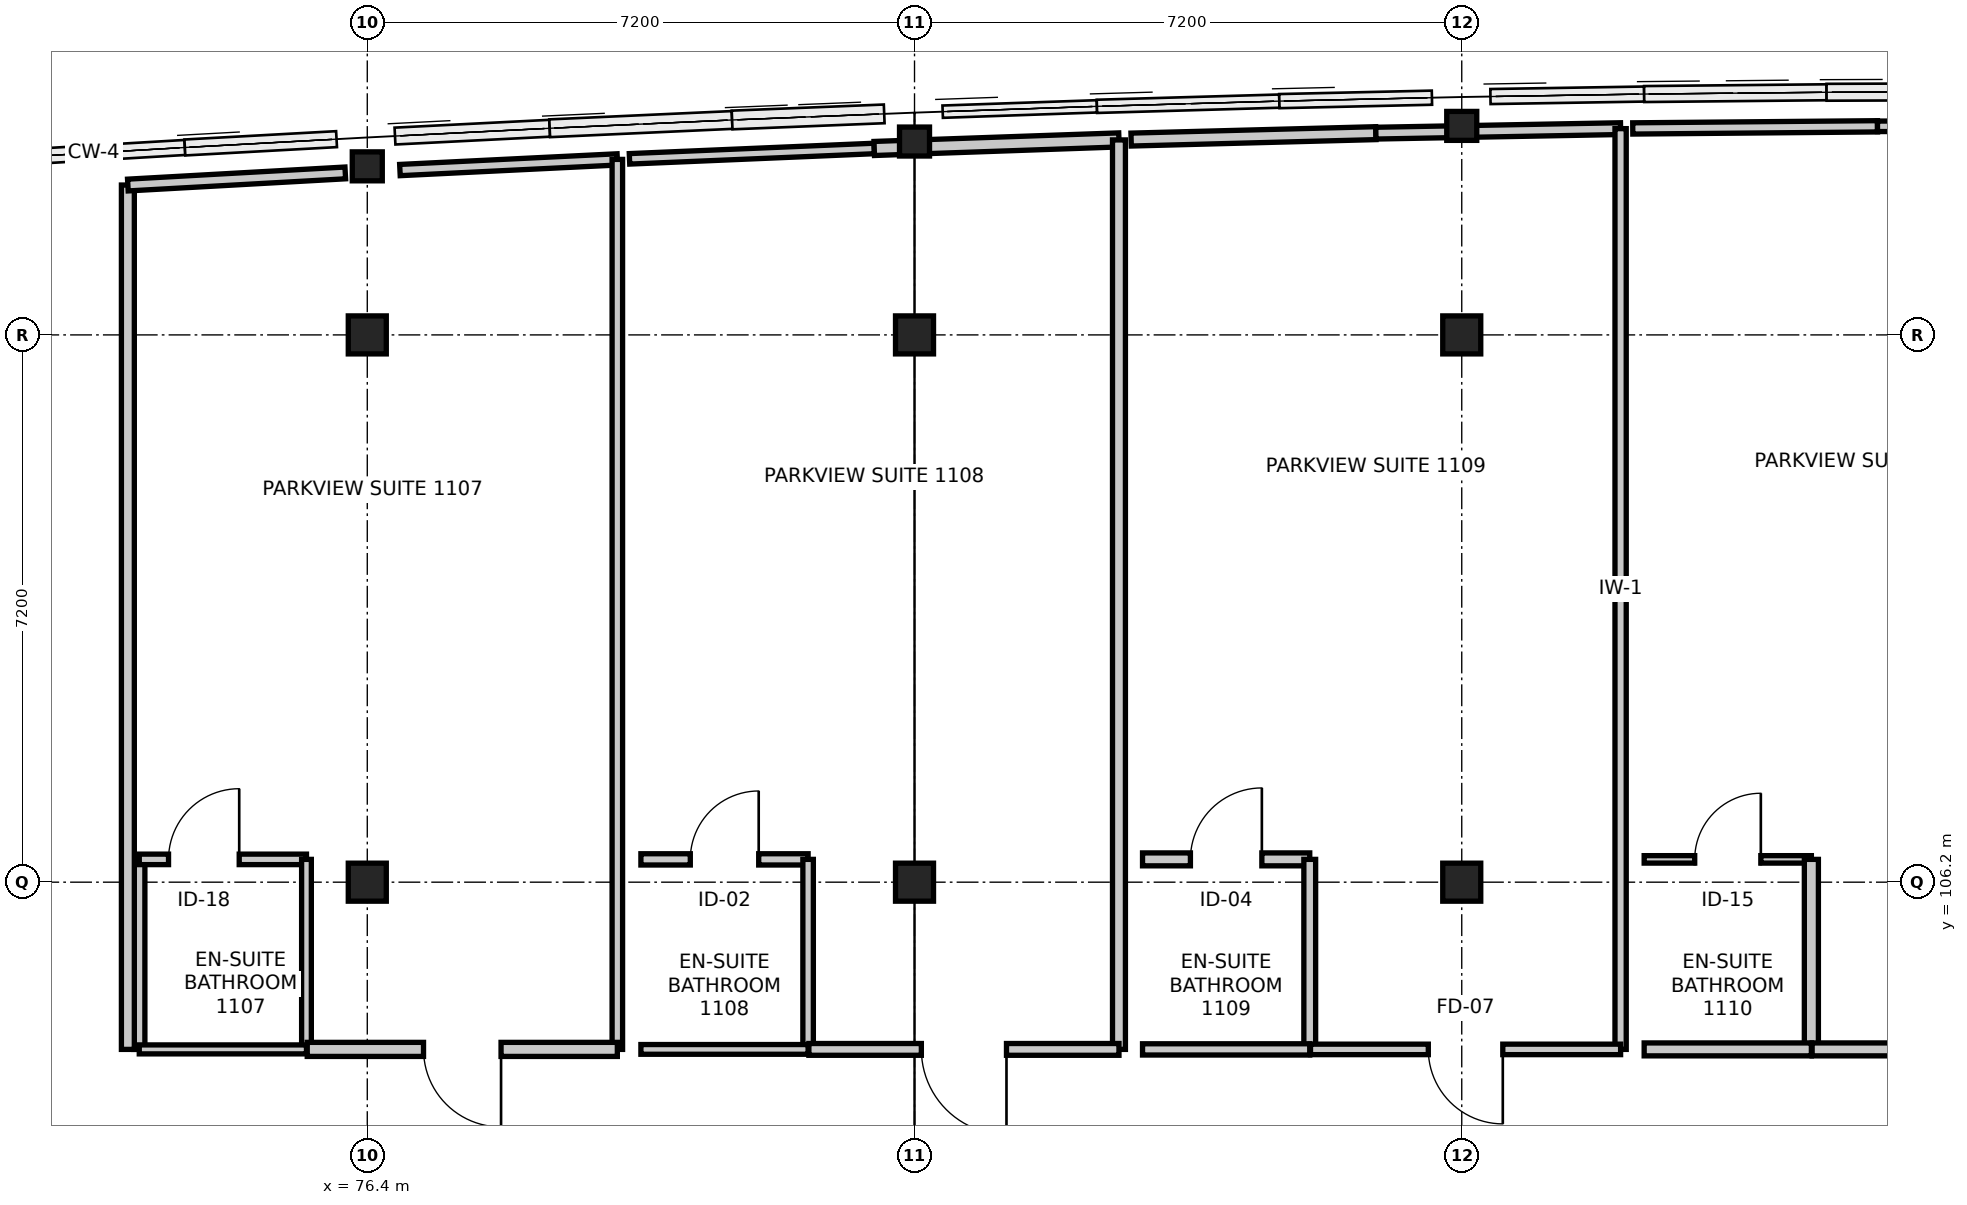
"""IFC4 building model, lengths in metres.
Left out: names, types, materials, properties, quantities, classifications, styles, units other than length and angle.
Written with IfcOpenShell. Run it as: python <this file> out.ifc"""

import sys

from ifc_helpers import new_model, si_unit, direction, frame, frame_2d, origin, origin_2d, place, context, subcontext, project, spatial, rectangle, i_section, extrude, element, fill, save


model = new_model("IFC4")
c1 = context("Model", 3, precision=1e-05, world=origin(), true_north=direction((0.0, 1.0)))
c2 = subcontext(c1, "Body", "Model", "MODEL_VIEW")
j1 = project(units=[si_unit("LENGTHUNIT", "METRE"), si_unit("PLANEANGLEUNIT", "RADIAN")], contexts=[c1])
p1 = place(None, origin())
s1 = spatial("IfcSite", under=j1, at=p1, CompositionType="ELEMENT")
p2 = place(p1, origin())
s2 = spatial("IfcBuilding", under=s1, at=p2, CompositionType="ELEMENT")
p3 = place(p2, frame((0.0, 0.0, 44.4)))
s3 = spatial("IfcBuildingStorey", under=s2, at=p3, CompositionType="ELEMENT", Elevation=44.4)
for number, where, z_axis, x_axis in (
    (1, (76.4, 106.2, 0.0), (0.0, 0.0, 1.0), (1.0, 0.0, 0.0)),
    (2, (76.4, 113.4, 0.0), (0.0, 0.0, 1.0), (1.0, 0.0, 0.0)),
):
    element("IfcColumn", number, at=place(p3, frame(where, z_axis=z_axis, x_axis=x_axis)), inside=s3, PredefinedType="COLUMN", context=c2, shape_type="SweptSolid", body=[
        extrude(rectangle(XDim=0.5, YDim=0.5, at=origin_2d()), origin(), (0.0, 0.0, 1.0), 4.2),
    ])
p4 = place(p3, frame((76.4, 115.618, 0.0), z_axis=(0.0, 0.0, 1.0), x_axis=(1.0, 0.0, 0.0)))
e3 = element("IfcColumn", 3, at=p4, inside=s3, PredefinedType="COLUMN", context=c2, shape_type="SweptSolid", body=[
    extrude(i_section(OverallWidth=0.395, OverallDepth=0.381, WebThickness=0.018, FlangeThickness=0.03, FilletRadius=0.015, at=origin_2d()), origin(), (0.0, 0.0, 1.0), 4.2),
])
for number, where, z_axis, x_axis in (
    (4, (83.6, 106.2, 0.0), (0.0, 0.0, 1.0), (1.0, 0.0, 0.0)),
    (5, (83.6, 113.4, 0.0), (0.0, 0.0, 1.0), (1.0, 0.0, 0.0)),
):
    element("IfcColumn", number, at=place(p3, frame(where, z_axis=z_axis, x_axis=x_axis)), inside=s3, PredefinedType="COLUMN", context=c2, shape_type="SweptSolid", body=[
        extrude(rectangle(XDim=0.5, YDim=0.5, at=origin_2d()), origin(), (0.0, 0.0, 1.0), 4.2),
    ])
p5 = place(p3, frame((83.6, 115.944, 0.0), z_axis=(0.0, 0.0, 1.0), x_axis=(1.0, 0.0, 0.0)))
e6 = element("IfcColumn", 6, at=p5, inside=s3, PredefinedType="COLUMN", context=c2, shape_type="SweptSolid", body=[
    extrude(i_section(OverallWidth=0.395, OverallDepth=0.381, WebThickness=0.018, FlangeThickness=0.03, FilletRadius=0.015, at=origin_2d()), origin(), (0.0, 0.0, 1.0), 4.2),
])
for number, where, z_axis, x_axis in (
    (7, (90.8, 106.2, 0.0), (0.0, 0.0, 1.0), (1.0, 0.0, 0.0)),
    (8, (90.8, 113.4, 0.0), (0.0, 0.0, 1.0), (1.0, 0.0, 0.0)),
):
    element("IfcColumn", number, at=place(p3, frame(where, z_axis=z_axis, x_axis=x_axis)), inside=s3, PredefinedType="COLUMN", context=c2, shape_type="SweptSolid", body=[
        extrude(rectangle(XDim=0.5, YDim=0.5, at=origin_2d()), origin(), (0.0, 0.0, 1.0), 4.2),
    ])
p6 = place(p3, frame((90.8, 116.15, 0.0), z_axis=(0.0, 0.0, 1.0), x_axis=(1.0, 0.0, 0.0)))
e9 = element("IfcColumn", 9, at=p6, inside=s3, PredefinedType="COLUMN", context=c2, shape_type="SweptSolid", body=[
    extrude(i_section(OverallWidth=0.395, OverallDepth=0.381, WebThickness=0.018, FlangeThickness=0.03, FilletRadius=0.015, at=origin_2d()), origin(), (0.0, 0.0, 1.0), 4.2),
])
p7 = place(p3, frame((73.4, 104.0, 0.0), z_axis=(0.0, 0.0, 1.0), x_axis=(0.0, 1.0, 0.0)))
e10 = element("IfcWall", 10, at=p7, inside=s3, PredefinedType="PARTITIONING", context=c2, shape_type="SweptSolid", body=[
    extrude(rectangle(XDim=2.5, YDim=0.148, at=frame_2d((1.25, 0.0))), origin(), (0.0, 0.0, 1.0), 3.335),
])
p8 = place(p3, frame((73.4, 106.5, 0.0), z_axis=(0.0, 0.0, 1.0), x_axis=(1.0, 0.0, 0.0)))
e11 = element("IfcWall", 11, at=p8, inside=s3, PredefinedType="PARTITIONING", context=c2, shape_type="SweptSolid", body=[
    extrude(rectangle(XDim=2.2, YDim=0.138, at=frame_2d((1.1, 0.0))), origin(), (0.0, 0.0, 1.0), 3.95),
])
p9 = place(p8, frame((0.385, 0.0, 0.0)))
e12 = element("IfcOpeningElement", 12, at=p9, cuts=e11, PredefinedType="OPENING", context=c2, shape_type="SweptSolid", body=[
    extrude(rectangle(XDim=0.93, YDim=2.13, at=frame_2d((0.465, 1.065))), frame((0.0, 0.079, 0.0), z_axis=(0.0, -1.0, 0.0), x_axis=(1.0, 0.0, 0.0)), (0.0, 0.0, 1.0), 0.158),
])
p10 = place(p3, frame((75.6, 106.5, 0.0), z_axis=(0.0, 0.0, 1.0), x_axis=(0.0, -1.0, 0.0)))
e13 = element("IfcWall", 13, at=p10, inside=s3, PredefinedType="PARTITIONING", context=c2, shape_type="SweptSolid", body=[
    extrude(rectangle(XDim=2.5, YDim=0.128, at=frame_2d((1.25, 0.0))), origin(), (0.0, 0.0, 1.0), 3.335),
])
p11 = place(p3, frame((75.6, 104.0, 0.0), z_axis=(0.0, 0.0, 1.0), x_axis=(-1.0, 0.0, 0.0)))
e14 = element("IfcWall", 14, at=p11, inside=s3, PredefinedType="PARTITIONING", context=c2, shape_type="SweptSolid", body=[
    extrude(rectangle(XDim=2.2, YDim=0.118, at=frame_2d((1.1, 0.0))), origin(), (0.0, 0.0, 1.0), 3.95),
])
p12 = place(p3, frame((73.25, 104.0, 0.0), z_axis=(0.0, 0.0, 1.0), x_axis=(0.0, 1.0, 0.0)))
e15 = element("IfcWall", 15, at=p12, inside=s3, PredefinedType="PARTITIONING", context=c2, shape_type="SweptSolid", body=[
    extrude(rectangle(XDim=11.372, YDim=0.17, at=frame_2d((5.686, 0.0))), origin(), (0.0, 0.0, 1.0), 3.335),
])
p13 = place(p3, frame((73.25, 115.372, 0.0), z_axis=(0.0, 0.0, 1.0), x_axis=(0.998450636667, 0.05564464161, 0.0)))
e16 = element("IfcWall", 16, at=p13, inside=s3, PredefinedType="PARTITIONING", context=c2, shape_type="SweptSolid", body=[
    extrude(rectangle(XDim=2.865, YDim=0.155, at=frame_2d((1.433, 0.0))), origin(), (0.0, 0.0, 1.0), 3.526),
])
p14 = place(p3, frame((76.83, 115.569, 0.0), z_axis=(0.0, 0.0, 1.0), x_axis=(0.998802007512, 0.048934137275, 0.0)))
e17 = element("IfcWall", 17, at=p14, inside=s3, PredefinedType="PARTITIONING", context=c2, shape_type="SweptSolid", body=[
    extrude(rectangle(XDim=2.864, YDim=0.148, at=frame_2d((1.432, 0.0))), origin(), (0.0, 0.0, 1.0), 3.526),
])
p15 = place(p3, frame((79.69, 115.709, 0.0), z_axis=(0.0, 0.0, 1.0), x_axis=(0.0, -1.0, 0.0)))
e18 = element("IfcWall", 18, at=p15, inside=s3, PredefinedType="PARTITIONING", context=c2, shape_type="SweptSolid", body=[
    extrude(rectangle(XDim=11.709, YDim=0.138, at=frame_2d((5.854, 0.0))), origin(), (0.0, 0.0, 1.0), 3.335),
])
p16 = place(p3, frame((79.69, 104.0, 0.0), z_axis=(0.0, 0.0, 1.0), x_axis=(-1.0, 0.0, 0.0)))
e19 = element("IfcWall", 19, at=p16, inside=s3, PredefinedType="PARTITIONING", context=c2, shape_type="SweptSolid", body=[
    extrude(rectangle(XDim=4.08, YDim=0.185, at=frame_2d((2.04, 0.0))), origin(), (0.0, 0.0, 1.0), 3.285),
])
p17 = place(p16, frame((1.53, 0.0, 0.0)))
e20 = element("IfcOpeningElement", 20, at=p17, cuts=e19, PredefinedType="OPENING", context=c2, shape_type="SweptSolid", body=[
    extrude(rectangle(XDim=1.02, YDim=2.15, at=frame_2d((0.51, 1.075))), frame((0.0, 0.103, 0.0), z_axis=(0.0, -1.0, 0.0), x_axis=(1.0, 0.0, 0.0)), (0.0, 0.0, 1.0), 0.205),
])
p18 = place(p3, frame((80.0, 106.5, 0.0), z_axis=(0.0, 0.0, 1.0), x_axis=(1.0, 0.0, 0.0)))
e21 = element("IfcWall", 21, at=p18, inside=s3, PredefinedType="PARTITIONING", context=c2, shape_type="SweptSolid", body=[
    extrude(rectangle(XDim=2.2, YDim=0.148, at=frame_2d((1.1, 0.0))), origin(), (0.0, 0.0, 1.0), 3.95),
])
p19 = place(p18, frame((0.65, 0.0, 0.0)))
e22 = element("IfcOpeningElement", 22, at=p19, cuts=e21, PredefinedType="OPENING", context=c2, shape_type="SweptSolid", body=[
    extrude(rectangle(XDim=0.9, YDim=2.08, at=frame_2d((0.45, 1.04))), frame((0.0, 0.084, 0.0), z_axis=(0.0, -1.0, 0.0), x_axis=(1.0, 0.0, 0.0)), (0.0, 0.0, 1.0), 0.168),
])
p20 = place(p3, frame((82.2, 106.5, 0.0), z_axis=(0.0, 0.0, 1.0), x_axis=(0.0, -1.0, 0.0)))
e23 = element("IfcWall", 23, at=p20, inside=s3, PredefinedType="PARTITIONING", context=c2, shape_type="SweptSolid", body=[
    extrude(rectangle(XDim=2.5, YDim=0.138, at=frame_2d((1.25, 0.0))), origin(), (0.0, 0.0, 1.0), 3.335),
])
p21 = place(p3, frame((82.2, 104.0, 0.0), z_axis=(0.0, 0.0, 1.0), x_axis=(-1.0, 0.0, 0.0)))
e24 = element("IfcWall", 24, at=p21, inside=s3, PredefinedType="PARTITIONING", context=c2, shape_type="SweptSolid", body=[
    extrude(rectangle(XDim=2.2, YDim=0.128, at=frame_2d((1.1, 0.0))), origin(), (0.0, 0.0, 1.0), 3.95),
])
p22 = place(p3, frame((79.85, 115.716, 0.0), z_axis=(0.0, 0.0, 1.0), x_axis=(0.999103014869, 0.042345787043, 0.0)))
e25 = element("IfcWall", 25, at=p22, inside=s3, PredefinedType="PARTITIONING", context=c2, shape_type="SweptSolid", body=[
    extrude(rectangle(XDim=3.223, YDim=0.138, at=frame_2d((1.611, 0.0))), origin(), (0.0, 0.0, 1.0), 3.526),
])
p23 = place(p3, frame((83.07, 115.853, 0.0), z_axis=(0.0, 0.0, 1.0), x_axis=(0.999389690127, 0.034932037846, 0.0)))
e26 = element("IfcWall", 26, at=p23, inside=s3, PredefinedType="PARTITIONING", context=c2, shape_type="SweptSolid", body=[
    extrude(rectangle(XDim=3.222, YDim=0.185, at=frame_2d((1.611, 0.0))), origin(), (0.0, 0.0, 1.0), 3.526),
])
p24 = place(p3, frame((86.29, 115.965, 0.0), z_axis=(0.0, 0.0, 1.0), x_axis=(0.0, -1.0, 0.0)))
e27 = element("IfcWall", 27, at=p24, inside=s3, PredefinedType="PARTITIONING", context=c2, shape_type="SweptSolid", body=[
    extrude(rectangle(XDim=11.965, YDim=0.17, at=frame_2d((5.983, 0.0))), origin(), (0.0, 0.0, 1.0), 3.335),
])
p25 = place(p3, frame((86.29, 104.0, 0.0), z_axis=(0.0, 0.0, 1.0), x_axis=(-1.0, 0.0, 0.0)))
e28 = element("IfcWall", 28, at=p25, inside=s3, PredefinedType="PARTITIONING", context=c2, shape_type="SweptSolid", body=[
    extrude(rectangle(XDim=4.08, YDim=0.155, at=frame_2d((2.04, 0.0))), origin(), (0.0, 0.0, 1.0), 3.285),
])
p26 = place(p25, frame((1.48, 0.0, 0.0)))
e29 = element("IfcOpeningElement", 29, at=p26, cuts=e28, PredefinedType="OPENING", context=c2, shape_type="SweptSolid", body=[
    extrude(rectangle(XDim=1.12, YDim=2.2, at=frame_2d((0.56, 1.1))), frame((0.0, 0.087, 0.0), z_axis=(0.0, -1.0, 0.0), x_axis=(1.0, 0.0, 0.0)), (0.0, 0.0, 1.0), 0.175),
])
p27 = place(p3, frame((86.6, 106.5, 0.0), z_axis=(0.0, 0.0, 1.0), x_axis=(1.0, 0.0, 0.0)))
e30 = element("IfcWall", 30, at=p27, inside=s3, PredefinedType="PARTITIONING", context=c2, shape_type="SweptSolid", body=[
    extrude(rectangle(XDim=2.2, YDim=0.17, at=frame_2d((1.1, 0.0))), origin(), (0.0, 0.0, 1.0), 3.335),
])
p28 = place(p27, frame((0.63, 0.0, 0.0)))
e31 = element("IfcOpeningElement", 31, at=p28, cuts=e30, PredefinedType="OPENING", context=c2, shape_type="SweptSolid", body=[
    extrude(rectangle(XDim=0.94, YDim=2.12, at=frame_2d((0.47, 1.06))), frame((0.0, 0.095, 0.0), z_axis=(0.0, -1.0, 0.0), x_axis=(1.0, 0.0, 0.0)), (0.0, 0.0, 1.0), 0.19),
])
p29 = place(p3, frame((88.8, 106.5, 0.0), z_axis=(0.0, 0.0, 1.0), x_axis=(0.0, -1.0, 0.0)))
e32 = element("IfcWall", 32, at=p29, inside=s3, PredefinedType="PARTITIONING", context=c2, shape_type="SweptSolid", body=[
    extrude(rectangle(XDim=2.5, YDim=0.155, at=frame_2d((1.25, 0.0))), origin(), (0.0, 0.0, 1.0), 3.335),
])
p30 = place(p3, frame((88.8, 104.0, 0.0), z_axis=(0.0, 0.0, 1.0), x_axis=(-1.0, 0.0, 0.0)))
e33 = element("IfcWall", 33, at=p30, inside=s3, PredefinedType="PARTITIONING", context=c2, shape_type="SweptSolid", body=[
    extrude(rectangle(XDim=2.2, YDim=0.148, at=frame_2d((1.1, 0.0))), origin(), (0.0, 0.0, 1.0), 3.95),
])
p31 = place(p3, frame((86.45, 115.97, 0.0), z_axis=(0.0, 0.0, 1.0), x_axis=(0.999656066588, 0.026224960121, 0.0)))
e34 = element("IfcWall", 34, at=p31, inside=s3, PredefinedType="PARTITIONING", context=c2, shape_type="SweptSolid", body=[
    extrude(rectangle(XDim=3.221, YDim=0.17, at=frame_2d((1.611, 0.0))), origin(), (0.0, 0.0, 1.0), 3.526),
])
p32 = place(p3, frame((89.67, 116.054, 0.0), z_axis=(0.0, 0.0, 1.0), x_axis=(0.999828914006, 0.018497100236, 0.0)))
e35 = element("IfcWall", 35, at=p32, inside=s3, PredefinedType="PARTITIONING", context=c2, shape_type="SweptSolid", body=[
    extrude(rectangle(XDim=3.22, YDim=0.155, at=frame_2d((1.61, 0.0))), origin(), (0.0, 0.0, 1.0), 3.526),
])
p33 = place(p3, frame((92.89, 116.114, 0.0), z_axis=(0.0, 0.0, 1.0), x_axis=(0.0, -1.0, 0.0)))
e36 = element("IfcWall", 36, at=p33, inside=s3, PredefinedType="PARTITIONING", context=c2, shape_type="SweptSolid", body=[
    extrude(rectangle(XDim=12.114, YDim=0.148, at=frame_2d((6.057, 0.0))), origin(), (0.0, 0.0, 1.0), 3.335),
])
p34 = place(p3, frame((92.89, 104.0, 0.0), z_axis=(0.0, 0.0, 1.0), x_axis=(-1.0, 0.0, 0.0)))
e37 = element("IfcWall", 37, at=p34, inside=s3, PredefinedType="PARTITIONING", context=c2, shape_type="SweptSolid", body=[
    extrude(rectangle(XDim=4.08, YDim=0.138, at=frame_2d((2.04, 0.0))), origin(), (0.0, 0.0, 1.0), 3.285),
])
p35 = place(p34, frame((1.55, 0.0, 0.0)))
e38 = element("IfcOpeningElement", 38, at=p35, cuts=e37, PredefinedType="OPENING", context=c2, shape_type="SweptSolid", body=[
    extrude(rectangle(XDim=0.98, YDim=2.15, at=frame_2d((0.49, 1.075))), frame((0.0, 0.079, 0.0), z_axis=(0.0, -1.0, 0.0), x_axis=(1.0, 0.0, 0.0)), (0.0, 0.0, 1.0), 0.158),
])
p36 = place(p3, frame((93.2, 106.5, 0.0), z_axis=(0.0, 0.0, 1.0), x_axis=(1.0, 0.0, 0.0)))
e39 = element("IfcWall", 39, at=p36, inside=s3, PredefinedType="PARTITIONING", context=c2, shape_type="SweptSolid", body=[
    extrude(rectangle(XDim=2.2, YDim=0.098, at=frame_2d((1.1, 0.0))), origin(), (0.0, 0.0, 1.0), 3.95),
])
p37 = place(p36, frame((0.665, 0.0, 0.0)))
e40 = element("IfcOpeningElement", 40, at=p37, cuts=e39, PredefinedType="OPENING", context=c2, shape_type="SweptSolid", body=[
    extrude(rectangle(XDim=0.87, YDim=2.07, at=frame_2d((0.435, 1.035))), frame((0.0, 0.059, 0.0), z_axis=(0.0, -1.0, 0.0), x_axis=(1.0, 0.0, 0.0)), (0.0, 0.0, 1.0), 0.118),
])
p38 = place(p3, frame((95.4, 106.5, 0.0), z_axis=(0.0, 0.0, 1.0), x_axis=(0.0, -1.0, 0.0)))
e41 = element("IfcWall", 41, at=p38, inside=s3, PredefinedType="PARTITIONING", context=c2, shape_type="SweptSolid", body=[
    extrude(rectangle(XDim=2.5, YDim=0.185, at=frame_2d((1.25, 0.0))), origin(), (0.0, 0.0, 1.0), 3.335),
])
p39 = place(p3, frame((95.4, 104.0, 0.0), z_axis=(0.0, 0.0, 1.0), x_axis=(-1.0, 0.0, 0.0)))
e42 = element("IfcWall", 42, at=p39, inside=s3, PredefinedType="PARTITIONING", context=c2, shape_type="SweptSolid", body=[
    extrude(rectangle(XDim=2.2, YDim=0.17, at=frame_2d((1.1, 0.0))), origin(), (0.0, 0.0, 1.0), 3.95),
])
p40 = place(p3, frame((93.05, 116.116, 0.0), z_axis=(0.0, 0.0, 1.0), x_axis=(0.999961988309, 0.00871905593, 0.0)))
e43 = element("IfcWall", 43, at=p40, inside=s3, PredefinedType="PARTITIONING", context=c2, shape_type="SweptSolid", body=[
    extrude(rectangle(XDim=3.22, YDim=0.148, at=frame_2d((1.61, 0.0))), origin(), (0.0, 0.0, 1.0), 3.526),
])
p41 = place(p3, frame((96.27, 116.144, 0.0), z_axis=(0.0, 0.0, 1.0), x_axis=(0.99999997413, 0.000227462273, 0.0)))
e44 = element("IfcWall", 44, at=p41, inside=s3, PredefinedType="PARTITIONING", context=c2, shape_type="SweptSolid", body=[
    extrude(rectangle(XDim=3.22, YDim=0.138, at=frame_2d((1.61, 0.0))), origin(), (0.0, 0.0, 1.0), 3.526),
])
p42 = place(p3, frame((99.49, 104.0, 0.0), z_axis=(0.0, 0.0, 1.0), x_axis=(-1.0, 0.0, 0.0)))
e45 = element("IfcWall", 45, at=p42, inside=s3, PredefinedType="PARTITIONING", context=c2, shape_type="SweptSolid", body=[
    extrude(rectangle(XDim=4.08, YDim=0.17, at=frame_2d((2.04, 0.0))), origin(), (0.0, 0.0, 1.0), 3.285),
])
p43 = place(p42, frame((1.51, 0.0, 0.0)))
e46 = element("IfcOpeningElement", 46, at=p43, cuts=e45, PredefinedType="OPENING", context=c2, shape_type="SweptSolid", body=[
    extrude(rectangle(XDim=1.06, YDim=2.2, at=frame_2d((0.53, 1.1))), frame((0.0, 0.095, 0.0), z_axis=(0.0, -1.0, 0.0), x_axis=(1.0, 0.0, 0.0)), (0.0, 0.0, 1.0), 0.19),
])
p44 = place(p2, frame((0.0, 0.0, 48.6)))
p45 = place(p44, frame((0.0, 0.0, -0.25)))
p46 = place(p45, frame((94.4, 102.6, 0.0)))
p47 = place(p46, frame((0.0, 0.0, 0.2)))
e47 = element("IfcWindow", 47, at=p47, inside=s3, PartitioningType="SINGLE_PANEL", PredefinedType="SKYLIGHT", context=c2, shape_type="SweptSolid", body=[
    extrude(rectangle(XDim=3.6, YDim=2.8, at=origin_2d()), origin(), (0.0, 0.0, 1.0), 0.05),
])
p48 = place(p9, origin())
e48 = element("IfcDoor", 48, at=p48, inside=s3, OperationType="SINGLE_SWING_RIGHT", PredefinedType="DOOR", context=c2, shape_type="SweptSolid", body=[
    extrude(rectangle(XDim=0.93, YDim=2.13, at=frame_2d((0.465, 1.065))), frame((0.0, 0.025, 0.0), z_axis=(0.0, -1.0, 0.0), x_axis=(1.0, 0.0, 0.0)), (0.0, 0.0, 1.0), 0.05),
])
fill(e12, e48)
p49 = place(p17, origin())
e49 = element("IfcDoor", 49, at=p49, inside=s3, OperationType="SINGLE_SWING_LEFT", PredefinedType="DOOR", context=c2, shape_type="SweptSolid", body=[
    extrude(rectangle(XDim=1.02, YDim=2.15, at=frame_2d((0.51, 1.075))), frame((0.0, 0.025, 0.0), z_axis=(0.0, -1.0, 0.0), x_axis=(1.0, 0.0, 0.0)), (0.0, 0.0, 1.0), 0.05),
])
fill(e20, e49)
p50 = place(p19, origin())
e50 = element("IfcDoor", 50, at=p50, inside=s3, OperationType="SINGLE_SWING_RIGHT", PredefinedType="DOOR", context=c2, shape_type="SweptSolid", body=[
    extrude(rectangle(XDim=0.9, YDim=2.08, at=frame_2d((0.45, 1.04))), frame((0.0, 0.025, 0.0), z_axis=(0.0, -1.0, 0.0), x_axis=(1.0, 0.0, 0.0)), (0.0, 0.0, 1.0), 0.05),
])
fill(e22, e50)
p51 = place(p26, origin())
e51 = element("IfcDoor", 51, at=p51, inside=s3, OperationType="SINGLE_SWING_LEFT", PredefinedType="DOOR", context=c2, shape_type="SweptSolid", body=[
    extrude(rectangle(XDim=1.12, YDim=2.2, at=frame_2d((0.56, 1.1))), frame((0.0, 0.025, 0.0), z_axis=(0.0, -1.0, 0.0), x_axis=(1.0, 0.0, 0.0)), (0.0, 0.0, 1.0), 0.05),
])
fill(e29, e51)
p52 = place(p28, origin())
e52 = element("IfcDoor", 52, at=p52, inside=s3, OperationType="SINGLE_SWING_RIGHT", PredefinedType="DOOR", context=c2, shape_type="SweptSolid", body=[
    extrude(rectangle(XDim=0.94, YDim=2.12, at=frame_2d((0.47, 1.06))), frame((0.0, 0.025, 0.0), z_axis=(0.0, -1.0, 0.0), x_axis=(1.0, 0.0, 0.0)), (0.0, 0.0, 1.0), 0.05),
])
fill(e31, e52)
p53 = place(p35, origin())
e53 = element("IfcDoor", 53, at=p53, inside=s3, OperationType="SINGLE_SWING_LEFT", PredefinedType="DOOR", context=c2, shape_type="SweptSolid", body=[
    extrude(rectangle(XDim=0.98, YDim=2.15, at=frame_2d((0.49, 1.075))), frame((0.0, 0.025, 0.0), z_axis=(0.0, -1.0, 0.0), x_axis=(1.0, 0.0, 0.0)), (0.0, 0.0, 1.0), 0.05),
])
fill(e38, e53)
p54 = place(p37, origin())
e54 = element("IfcDoor", 54, at=p54, inside=s3, OperationType="SINGLE_SWING_RIGHT", PredefinedType="DOOR", context=c2, shape_type="SweptSolid", body=[
    extrude(rectangle(XDim=0.87, YDim=2.07, at=frame_2d((0.435, 1.035))), frame((0.0, 0.025, 0.0), z_axis=(0.0, -1.0, 0.0), x_axis=(1.0, 0.0, 0.0)), (0.0, 0.0, 1.0), 0.05),
])
fill(e40, e54)
save(model, sys.argv[1])
